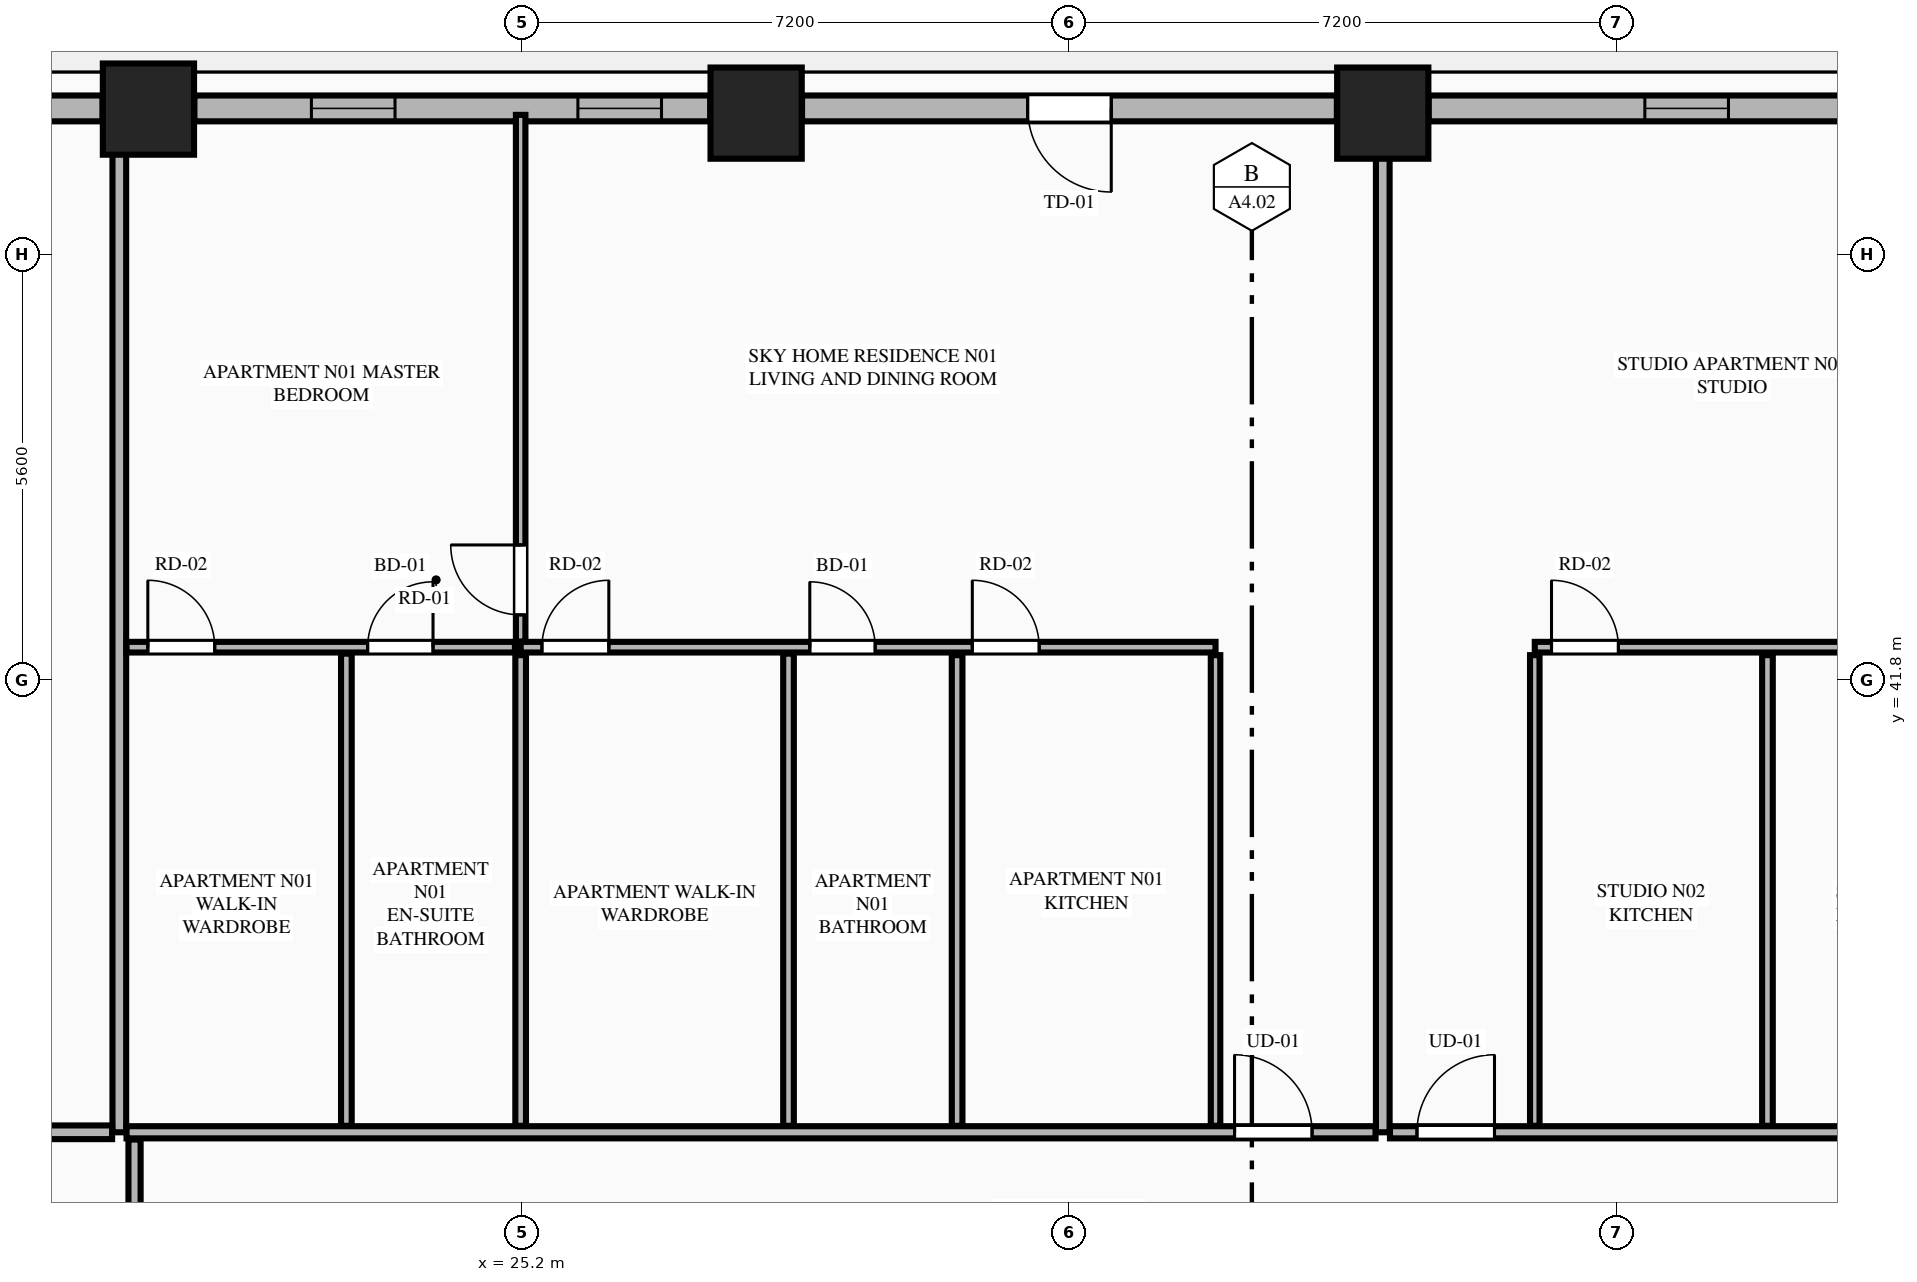
"""IFC4 building model, lengths in metres.
Left out: names, types, materials, properties, quantities, classifications, styles, units other than length and angle.
Written with IfcOpenShell. Run it as: python <this file> out.ifc"""

import sys

from ifc_helpers import new_model, si_unit, direction, frame, frame_2d, origin, origin_2d, place, context, subcontext, project, spatial, rectangle, extrude, element, fill, save


model = new_model("IFC4")
c1 = context("Model", 3, precision=1e-05, world=origin(), true_north=direction((0.0, 1.0)))
c2 = subcontext(c1, "Body", "Model", "MODEL_VIEW")
j1 = project(units=[si_unit("LENGTHUNIT", "METRE"), si_unit("PLANEANGLEUNIT", "RADIAN")], contexts=[c1])
p1 = place(None, origin())
s1 = spatial("IfcSite", under=j1, at=p1, CompositionType="ELEMENT")
p2 = place(p1, origin())
s2 = spatial("IfcBuilding", under=s1, at=p2, CompositionType="ELEMENT")
p3 = place(p2, frame((0.0, 0.0, 32.0)))
s3 = spatial("IfcBuildingStorey", under=s2, at=p3, CompositionType="ELEMENT", Elevation=32.0)
for number, where, z_axis, x_axis in (
    (1, (36.522, 49.258, 0.0), (0.0, 0.0, 1.0), (1.0, 0.0, 0.0)),
    (2, (28.278, 49.258, 0.0), (0.0, 0.0, 1.0), (1.0, 0.0, 0.0)),
    (3, (20.283, 49.311, 0.0), (0.0, 0.0, 1.0), (1.0, 0.0, 0.0)),
):
    element("IfcColumn", number, at=place(p3, frame(where, z_axis=z_axis, x_axis=x_axis)), inside=s3, PredefinedType="COLUMN", context=c2, shape_type="SweptSolid", body=[
        extrude(rectangle(XDim=1.2, YDim=1.2, at=origin_2d()), origin(), (0.0, 0.0, 1.0), 3.55),
    ])
p4 = place(p3, frame((43.913, 49.32, 0.0), z_axis=(0.0, 0.0, 1.0), x_axis=(-1.0, 0.0, 0.0)))
e4 = element("IfcWall", 4, at=p4, inside=s3, PredefinedType="STANDARD", context=c2, shape_type="SweptSolid", body=[
    extrude(rectangle(XDim=6.787, YDim=0.34, at=frame_2d((3.394, 0.0))), origin(), (0.0, 0.0, 1.0), 2.787),
])
p5 = place(p4, frame((2.843, 0.0, 0.75)))
e5 = element("IfcOpeningElement", 5, at=p5, cuts=e4, PredefinedType="OPENING", context=c2, shape_type="SweptSolid", body=[
    extrude(rectangle(XDim=1.1, YDim=1.887, at=frame_2d((0.55, 0.943))), frame((0.0, 0.18, 0.0), z_axis=(0.0, -1.0, 0.0), x_axis=(1.0, 0.0, 0.0)), (0.0, 0.0, 1.0), 0.36),
])
p6 = place(p3, frame((35.918, 49.32, 0.0), z_axis=(0.0, 0.0, 1.0), x_axis=(-1.0, 0.0, 0.0)))
e6 = element("IfcWall", 6, at=p6, inside=s3, PredefinedType="STANDARD", context=c2, shape_type="SweptSolid", body=[
    extrude(rectangle(XDim=7.036, YDim=0.34, at=frame_2d((3.518, 0.0))), origin(), (0.0, 0.0, 1.0), 2.787),
])
p7 = place(p6, frame((2.968, 0.0, 0.0)))
e7 = element("IfcOpeningElement", 7, at=p7, cuts=e6, PredefinedType="OPENING", context=c2, shape_type="SweptSolid", body=[
    extrude(rectangle(XDim=1.1, YDim=2.25, at=frame_2d((0.55, 1.125))), frame((0.0, 0.18, 0.0), z_axis=(0.0, -1.0, 0.0), x_axis=(1.0, 0.0, 0.0)), (0.0, 0.0, 1.0), 0.36),
])
p8 = place(p3, frame((27.674, 49.32, 0.0), z_axis=(0.0, 0.0, 1.0), x_axis=(-1.0, 0.0, 0.0)))
e8 = element("IfcWall", 8, at=p8, inside=s3, PredefinedType="STANDARD", context=c2, shape_type="SweptSolid", body=[
    extrude(rectangle(XDim=6.787, YDim=0.34, at=frame_2d((3.394, 0.0))), origin(), (0.0, 0.0, 1.0), 2.787),
])
p9 = place(p8, frame((0.641, 0.0, 0.75)))
e9 = element("IfcOpeningElement", 9, at=p9, cuts=e8, PredefinedType="OPENING", context=c2, shape_type="SweptSolid", body=[
    extrude(rectangle(XDim=1.1, YDim=1.887, at=frame_2d((0.55, 0.943))), frame((0.0, 0.18, 0.0), z_axis=(0.0, -1.0, 0.0), x_axis=(1.0, 0.0, 0.0)), (0.0, 0.0, 1.0), 0.36),
])
p10 = place(p8, frame((4.147, 0.0, 0.75)))
e10 = element("IfcOpeningElement", 10, at=p10, cuts=e8, PredefinedType="OPENING", context=c2, shape_type="SweptSolid", body=[
    extrude(rectangle(XDim=1.1, YDim=1.887, at=frame_2d((0.55, 0.943))), frame((0.0, 0.18, 0.0), z_axis=(0.0, -1.0, 0.0), x_axis=(1.0, 0.0, 0.0)), (0.0, 0.0, 1.0), 0.36),
])
p11 = place(p3, frame((19.679, 49.32, 0.0), z_axis=(0.0, 0.0, 1.0), x_axis=(-1.0, 0.0, 0.0)))
e11 = element("IfcWall", 11, at=p11, inside=s3, PredefinedType="STANDARD", context=c2, shape_type="SweptSolid", body=[
    extrude(rectangle(XDim=1.245, YDim=0.34, at=frame_2d((0.623, 0.0))), origin(), (0.0, 0.0, 1.0), 3.33),
])
p12 = place(p3, frame((19.9, 35.85, 0.0), z_axis=(0.0, 0.0, 1.0), x_axis=(0.0, 1.0, 0.0)))
e12 = element("IfcWall", 12, at=p12, inside=s3, PredefinedType="PARTITIONING", context=c2, shape_type="SweptSolid", body=[
    extrude(rectangle(XDim=13.295, YDim=0.18, at=frame_2d((6.647, 0.0))), origin(), (0.0, 0.0, 1.0), 3.33),
])
p13 = place(p3, frame((36.522, 35.85, 0.0), z_axis=(0.0, 0.0, 1.0), x_axis=(0.0, 1.0, 0.0)))
e13 = element("IfcWall", 13, at=p13, inside=s3, PredefinedType="PARTITIONING", context=c2, shape_type="SweptSolid", body=[
    extrude(rectangle(XDim=13.295, YDim=0.18, at=frame_2d((6.647, 0.0))), origin(), (0.0, 0.0, 1.0), 2.636),
])
p14 = place(p3, frame((19.995, 35.85, 0.0), z_axis=(0.0, 0.0, 1.0), x_axis=(1.0, 0.0, 0.0)))
e14 = element("IfcWall", 14, at=p14, inside=s3, PredefinedType="PARTITIONING", context=c2, shape_type="SweptSolid", body=[
    extrude(rectangle(XDim=16.432, YDim=0.16, at=frame_2d((8.216, 0.0))), origin(), (0.0, 0.0, 1.0), 3.33),
])
p15 = place(p14, frame((14.577, 0.0, 0.0)))
e15 = element("IfcOpeningElement", 15, at=p15, cuts=e14, PredefinedType="OPENING", context=c2, shape_type="SweptSolid", body=[
    extrude(rectangle(XDim=1.02, YDim=2.25, at=frame_2d((0.51, 1.125))), frame((0.0, 0.09, 0.0), z_axis=(0.0, -1.0, 0.0), x_axis=(1.0, 0.0, 0.0)), (0.0, 0.0, 1.0), 0.18),
])
p16 = place(p3, frame((34.322, 35.935, 0.0), z_axis=(0.0, 0.0, 1.0), x_axis=(0.0, 1.0, 0.0)))
e16 = element("IfcWall", 16, at=p16, inside=s3, PredefinedType="PARTITIONING", context=c2, shape_type="SweptSolid", body=[
    extrude(rectangle(XDim=6.192, YDim=0.125, at=frame_2d((3.096, 0.0))), origin(), (0.0, 0.0, 1.0), 3.33),
])
p17 = place(p3, frame((25.18, 42.232, 0.0), z_axis=(0.0, 0.0, 1.0), x_axis=(1.0, 0.0, 0.0)))
e17 = element("IfcWall", 17, at=p17, inside=s3, PredefinedType="PLUMBINGWALL", context=c2, shape_type="SweptSolid", body=[
    extrude(rectangle(XDim=9.142, YDim=0.14, at=frame_2d((4.571, 0.0))), origin(), (0.0, 0.0, 1.0), 3.33),
])
p18 = place(p17, frame((0.28, 0.0, 0.0)))
e18 = element("IfcOpeningElement", 18, at=p18, cuts=e17, PredefinedType="OPENING", context=c2, shape_type="SweptSolid", body=[
    extrude(rectangle(XDim=0.88, YDim=2.15, at=frame_2d((0.44, 1.075))), frame((0.0, 0.08, 0.0), z_axis=(0.0, -1.0, 0.0), x_axis=(1.0, 0.0, 0.0)), (0.0, 0.0, 1.0), 0.16),
])
p19 = place(p17, frame((3.804, 0.0, 0.0)))
e19 = element("IfcOpeningElement", 19, at=p19, cuts=e17, PredefinedType="OPENING", context=c2, shape_type="SweptSolid", body=[
    extrude(rectangle(XDim=0.86, YDim=2.1, at=frame_2d((0.43, 1.05))), frame((0.0, 0.08, 0.0), z_axis=(0.0, -1.0, 0.0), x_axis=(1.0, 0.0, 0.0)), (0.0, 0.0, 1.0), 0.16),
])
p20 = place(p17, frame((5.942, 0.0, 0.0)))
e20 = element("IfcOpeningElement", 20, at=p20, cuts=e17, PredefinedType="OPENING", context=c2, shape_type="SweptSolid", body=[
    extrude(rectangle(XDim=0.88, YDim=2.15, at=frame_2d((0.44, 1.075))), frame((0.0, 0.08, 0.0), z_axis=(0.0, -1.0, 0.0), x_axis=(1.0, 0.0, 0.0)), (0.0, 0.0, 1.0), 0.16),
])
p21 = place(p3, frame((19.995, 42.232, 0.0), z_axis=(0.0, 0.0, 1.0), x_axis=(1.0, 0.0, 0.0)))
e21 = element("IfcWall", 21, at=p21, inside=s3, PredefinedType="PLUMBINGWALL", context=c2, shape_type="SweptSolid", body=[
    extrude(rectangle(XDim=5.11, YDim=0.14, at=frame_2d((2.555, 0.0))), origin(), (0.0, 0.0, 1.0), 3.33),
])
p22 = place(p21, frame((0.28, 0.0, 0.0)))
e22 = element("IfcOpeningElement", 22, at=p22, cuts=e21, PredefinedType="OPENING", context=c2, shape_type="SweptSolid", body=[
    extrude(rectangle(XDim=0.88, YDim=2.15, at=frame_2d((0.44, 1.075))), frame((0.0, 0.08, 0.0), z_axis=(0.0, -1.0, 0.0), x_axis=(1.0, 0.0, 0.0)), (0.0, 0.0, 1.0), 0.16),
])
p23 = place(p21, frame((3.172, 0.0, 0.0)))
e23 = element("IfcOpeningElement", 23, at=p23, cuts=e21, PredefinedType="OPENING", context=c2, shape_type="SweptSolid", body=[
    extrude(rectangle(XDim=0.86, YDim=2.1, at=frame_2d((0.43, 1.05))), frame((0.0, 0.08, 0.0), z_axis=(0.0, -1.0, 0.0), x_axis=(1.0, 0.0, 0.0)), (0.0, 0.0, 1.0), 0.16),
])
for number, where, z_axis, x_axis in (
    (24, (30.922, 35.935, 0.0), (0.0, 0.0, 1.0), (0.0, 1.0, 0.0)),
    (25, (25.18, 35.935, 0.0), (0.0, 0.0, 1.0), (0.0, 1.0, 0.0)),
):
    element("IfcWall", number, at=place(p3, frame(where, z_axis=z_axis, x_axis=x_axis)), inside=s3, PredefinedType="PLUMBINGWALL", context=c2, shape_type="SweptSolid", body=[
        extrude(rectangle(XDim=6.192, YDim=0.14, at=frame_2d((3.096, 0.0))), origin(), (0.0, 0.0, 1.0), 3.33),
    ])
p24 = place(p3, frame((25.18, 42.307, 0.0), z_axis=(0.0, 0.0, 1.0), x_axis=(0.0, 1.0, 0.0)))
e26 = element("IfcWall", 26, at=p24, inside=s3, PredefinedType="PARTITIONING", context=c2, shape_type="SweptSolid", body=[
    extrude(rectangle(XDim=6.928, YDim=0.125, at=frame_2d((3.464, 0.0))), origin(), (0.0, 0.0, 1.0), 3.33),
])
p25 = place(p24, frame((0.35, 0.0, 0.0)))
e27 = element("IfcOpeningElement", 27, at=p25, cuts=e26, PredefinedType="OPENING", context=c2, shape_type="SweptSolid", body=[
    extrude(rectangle(XDim=0.92, YDim=2.15, at=frame_2d((0.46, 1.075))), frame((0.0, 0.073, 0.0), z_axis=(0.0, -1.0, 0.0), x_axis=(1.0, 0.0, 0.0)), (0.0, 0.0, 1.0), 0.145),
])
p26 = place(p3, frame((28.704, 35.935, 0.0), z_axis=(0.0, 0.0, 1.0), x_axis=(0.0, 1.0, 0.0)))
e28 = element("IfcWall", 28, at=p26, inside=s3, PredefinedType="PLUMBINGWALL", context=c2, shape_type="SweptSolid", body=[
    extrude(rectangle(XDim=6.212, YDim=0.14, at=frame_2d((3.106, 0.0))), origin(), (0.0, 0.0, 1.0), 3.33),
])
p27 = place(p3, frame((22.887, 35.935, 0.0), z_axis=(0.0, 0.0, 1.0), x_axis=(0.0, 1.0, 0.0)))
e29 = element("IfcWall", 29, at=p27, inside=s3, PredefinedType="PLUMBINGWALL", context=c2, shape_type="SweptSolid", body=[
    extrude(rectangle(XDim=6.212, YDim=0.14, at=frame_2d((3.106, 0.0))), origin(), (0.0, 0.0, 1.0), 2.636),
])
p28 = place(p3, frame((36.617, 35.85, 0.0), z_axis=(0.0, 0.0, 1.0), x_axis=(1.0, 0.0, 0.0)))
e30 = element("IfcWall", 30, at=p28, inside=s3, PredefinedType="PARTITIONING", context=c2, shape_type="SweptSolid", body=[
    extrude(rectangle(XDim=8.188, YDim=0.16, at=frame_2d((4.094, 0.0))), origin(), (0.0, 0.0, 1.0), 3.33),
])
p29 = place(p28, frame((0.355, 0.0, 0.0)))
e31 = element("IfcOpeningElement", 31, at=p29, cuts=e30, PredefinedType="OPENING", context=c2, shape_type="SweptSolid", body=[
    extrude(rectangle(XDim=1.02, YDim=2.25, at=frame_2d((0.51, 1.125))), frame((0.0, 0.09, 0.0), z_axis=(0.0, -1.0, 0.0), x_axis=(1.0, 0.0, 0.0)), (0.0, 0.0, 1.0), 0.18),
])
p30 = place(p3, frame((38.522, 35.935, 0.0), z_axis=(0.0, 0.0, 1.0), x_axis=(0.0, 1.0, 0.0)))
e32 = element("IfcWall", 32, at=p30, inside=s3, PredefinedType="PARTITIONING", context=c2, shape_type="SweptSolid", body=[
    extrude(rectangle(XDim=6.192, YDim=0.125, at=frame_2d((3.096, 0.0))), origin(), (0.0, 0.0, 1.0), 3.33),
])
p31 = place(p3, frame((38.522, 42.232, 0.0), z_axis=(0.0, 0.0, 1.0), x_axis=(1.0, 0.0, 0.0)))
e33 = element("IfcWall", 33, at=p31, inside=s3, PredefinedType="PLUMBINGWALL", context=c2, shape_type="SweptSolid", body=[
    extrude(rectangle(XDim=6.283, YDim=0.14, at=frame_2d((3.142, 0.0))), origin(), (0.0, 0.0, 1.0), 3.33),
])
p32 = place(p31, frame((4.247, 0.0, 0.0)))
e34 = element("IfcOpeningElement", 34, at=p32, cuts=e33, PredefinedType="OPENING", context=c2, shape_type="SweptSolid", body=[
    extrude(rectangle(XDim=0.86, YDim=2.1, at=frame_2d((0.43, 1.05))), frame((0.0, 0.08, 0.0), z_axis=(0.0, -1.0, 0.0), x_axis=(1.0, 0.0, 0.0)), (0.0, 0.0, 1.0), 0.16),
])
p33 = place(p31, frame((0.22, 0.0, 0.0)))
e35 = element("IfcOpeningElement", 35, at=p33, cuts=e33, PredefinedType="OPENING", context=c2, shape_type="SweptSolid", body=[
    extrude(rectangle(XDim=0.88, YDim=2.15, at=frame_2d((0.44, 1.075))), frame((0.0, 0.08, 0.0), z_axis=(0.0, -1.0, 0.0), x_axis=(1.0, 0.0, 0.0)), (0.0, 0.0, 1.0), 0.16),
])
p34 = place(p3, frame((41.583, 35.935, 0.0), z_axis=(0.0, 0.0, 1.0), x_axis=(0.0, 1.0, 0.0)))
e36 = element("IfcWall", 36, at=p34, inside=s3, PredefinedType="PLUMBINGWALL", context=c2, shape_type="SweptSolid", body=[
    extrude(rectangle(XDim=6.192, YDim=0.14, at=frame_2d((3.096, 0.0))), origin(), (0.0, 0.0, 1.0), 3.33),
])
p35 = place(p3, frame((10.665, 35.85, 0.0), z_axis=(0.0, 0.0, 1.0), x_axis=(1.0, 0.0, 0.0)))
e37 = element("IfcWall", 37, at=p35, inside=s3, PredefinedType="PARTITIONING", context=c2, shape_type="SweptSolid", body=[
    extrude(rectangle(XDim=9.14, YDim=0.18, at=frame_2d((4.57, 0.0))), origin(), (0.0, 0.0, 1.0), 3.33),
])
p36 = place(p3, frame((20.1, 25.995, 0.0), z_axis=(0.0, 0.0, 1.0), x_axis=(0.0, 1.0, 0.0)))
e38 = element("IfcWall", 38, at=p36, inside=s3, PredefinedType="PARTITIONING", context=c2, shape_type="SweptSolid", body=[
    extrude(rectangle(XDim=9.76, YDim=0.16, at=frame_2d((4.88, 0.0))), origin(), (0.0, 0.0, 1.0), 3.33),
])
p37 = place(p36, frame((0.45, 0.0, 0.0)))
e39 = element("IfcOpeningElement", 39, at=p37, cuts=e38, PredefinedType="OPENING", context=c2, shape_type="SweptSolid", body=[
    extrude(rectangle(XDim=1.02, YDim=2.25, at=frame_2d((0.51, 1.125))), frame((0.0, 0.09, 0.0), z_axis=(0.0, -1.0, 0.0), x_axis=(1.0, 0.0, 0.0)), (0.0, 0.0, 1.0), 0.18),
])
p38 = place(p5, origin())
e40 = element("IfcWindow", 40, at=p38, inside=s3, PartitioningType="SINGLE_PANEL", PredefinedType="WINDOW", context=c2, shape_type="SweptSolid", body=[
    extrude(rectangle(XDim=1.1, YDim=1.887, at=frame_2d((0.55, 0.943))), frame((0.0, 0.03, 0.0), z_axis=(0.0, -1.0, 0.0), x_axis=(1.0, 0.0, 0.0)), (0.0, 0.0, 1.0), 0.06),
])
fill(e5, e40)
p39 = place(p7, origin())
e41 = element("IfcDoor", 41, at=p39, inside=s3, OperationType="SINGLE_SWING_LEFT", PredefinedType="DOOR", context=c2, shape_type="SweptSolid", body=[
    extrude(rectangle(XDim=1.1, YDim=2.25, at=frame_2d((0.55, 1.125))), frame((0.0, 0.025, 0.0), z_axis=(0.0, -1.0, 0.0), x_axis=(1.0, 0.0, 0.0)), (0.0, 0.0, 1.0), 0.05),
])
fill(e7, e41)
p40 = place(p9, origin())
e42 = element("IfcWindow", 42, at=p40, inside=s3, PartitioningType="SINGLE_PANEL", PredefinedType="WINDOW", context=c2, shape_type="SweptSolid", body=[
    extrude(rectangle(XDim=1.1, YDim=1.887, at=frame_2d((0.55, 0.943))), frame((0.0, 0.03, 0.0), z_axis=(0.0, -1.0, 0.0), x_axis=(1.0, 0.0, 0.0)), (0.0, 0.0, 1.0), 0.06),
])
fill(e9, e42)
p41 = place(p18, origin())
e43 = element("IfcDoor", 43, at=p41, inside=s3, OperationType="SINGLE_SWING_RIGHT", PredefinedType="DOOR", context=c2, shape_type="SweptSolid", body=[
    extrude(rectangle(XDim=0.88, YDim=2.15, at=frame_2d((0.44, 1.075))), frame((0.0, 0.025, 0.0), z_axis=(0.0, -1.0, 0.0), x_axis=(1.0, 0.0, 0.0)), (0.0, 0.0, 1.0), 0.05),
])
fill(e18, e43)
p42 = place(p19, origin())
e44 = element("IfcDoor", 44, at=p42, inside=s3, OperationType="SINGLE_SWING_LEFT", PredefinedType="DOOR", context=c2, shape_type="SweptSolid", body=[
    extrude(rectangle(XDim=0.86, YDim=2.1, at=frame_2d((0.43, 1.05))), frame((0.0, 0.025, 0.0), z_axis=(0.0, -1.0, 0.0), x_axis=(1.0, 0.0, 0.0)), (0.0, 0.0, 1.0), 0.05),
])
fill(e19, e44)
p43 = place(p22, origin())
e45 = element("IfcDoor", 45, at=p43, inside=s3, OperationType="SINGLE_SWING_LEFT", PredefinedType="DOOR", context=c2, shape_type="SweptSolid", body=[
    extrude(rectangle(XDim=0.88, YDim=2.15, at=frame_2d((0.44, 1.075))), frame((0.0, 0.025, 0.0), z_axis=(0.0, -1.0, 0.0), x_axis=(1.0, 0.0, 0.0)), (0.0, 0.0, 1.0), 0.05),
])
fill(e22, e45)
p44 = place(p23, origin())
e46 = element("IfcDoor", 46, at=p44, inside=s3, OperationType="SINGLE_SWING_RIGHT", PredefinedType="DOOR", context=c2, shape_type="SweptSolid", body=[
    extrude(rectangle(XDim=0.86, YDim=2.1, at=frame_2d((0.43, 1.05))), frame((0.0, 0.025, 0.0), z_axis=(0.0, -1.0, 0.0), x_axis=(1.0, 0.0, 0.0)), (0.0, 0.0, 1.0), 0.05),
])
fill(e23, e46)
p45 = place(p15, origin())
e47 = element("IfcDoor", 47, at=p45, inside=s3, OperationType="SINGLE_SWING_LEFT", PredefinedType="DOOR", context=c2, shape_type="SweptSolid", body=[
    extrude(rectangle(XDim=1.02, YDim=2.25, at=frame_2d((0.51, 1.125))), frame((0.0, 0.025, 0.0), z_axis=(0.0, -1.0, 0.0), x_axis=(1.0, 0.0, 0.0)), (0.0, 0.0, 1.0), 0.05),
])
fill(e15, e47)
p46 = place(p20, origin())
e48 = element("IfcDoor", 48, at=p46, inside=s3, OperationType="SINGLE_SWING_LEFT", PredefinedType="DOOR", context=c2, shape_type="SweptSolid", body=[
    extrude(rectangle(XDim=0.88, YDim=2.15, at=frame_2d((0.44, 1.075))), frame((0.0, 0.025, 0.0), z_axis=(0.0, -1.0, 0.0), x_axis=(1.0, 0.0, 0.0)), (0.0, 0.0, 1.0), 0.05),
])
fill(e20, e48)
p47 = place(p25, origin())
e49 = element("IfcDoor", 49, at=p47, inside=s3, OperationType="SINGLE_SWING_RIGHT", PredefinedType="DOOR", context=c2, shape_type="SweptSolid", body=[
    extrude(rectangle(XDim=0.92, YDim=2.15, at=frame_2d((0.46, 1.075))), frame((0.0, 0.025, 0.0), z_axis=(0.0, -1.0, 0.0), x_axis=(1.0, 0.0, 0.0)), (0.0, 0.0, 1.0), 0.05),
])
fill(e27, e49)
p48 = place(p29, origin())
e50 = element("IfcDoor", 50, at=p48, inside=s3, OperationType="SINGLE_SWING_RIGHT", PredefinedType="DOOR", context=c2, shape_type="SweptSolid", body=[
    extrude(rectangle(XDim=1.02, YDim=2.25, at=frame_2d((0.51, 1.125))), frame((0.0, 0.025, 0.0), z_axis=(0.0, -1.0, 0.0), x_axis=(1.0, 0.0, 0.0)), (0.0, 0.0, 1.0), 0.05),
])
fill(e31, e50)
p49 = place(p33, origin())
e51 = element("IfcDoor", 51, at=p49, inside=s3, OperationType="SINGLE_SWING_LEFT", PredefinedType="DOOR", context=c2, shape_type="SweptSolid", body=[
    extrude(rectangle(XDim=0.88, YDim=2.15, at=frame_2d((0.44, 1.075))), frame((0.0, 0.025, 0.0), z_axis=(0.0, -1.0, 0.0), x_axis=(1.0, 0.0, 0.0)), (0.0, 0.0, 1.0), 0.05),
])
fill(e35, e51)
p50 = place(p10, origin())
e52 = element("IfcWindow", 52, at=p50, inside=s3, PartitioningType="SINGLE_PANEL", PredefinedType="WINDOW", context=c2, shape_type="SweptSolid", body=[
    extrude(rectangle(XDim=1.1, YDim=1.887, at=frame_2d((0.55, 0.943))), frame((0.0, 0.03, 0.0), z_axis=(0.0, -1.0, 0.0), x_axis=(1.0, 0.0, 0.0)), (0.0, 0.0, 1.0), 0.06),
])
fill(e10, e52)
save(model, sys.argv[1])
